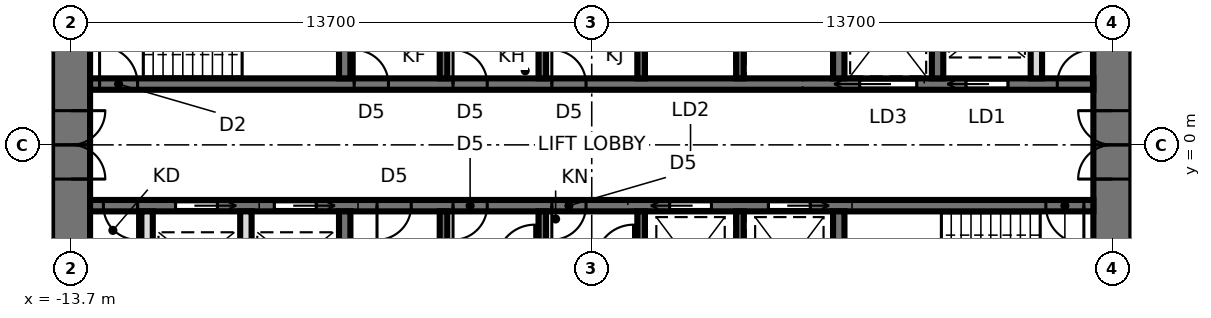
"""IFC4 building model, lengths in metres.
Left out: names, types, materials, properties, quantities, classifications, styles, units other than length and angle.
Written with IfcOpenShell. Run it as: python <this file> out.ifc"""

import sys

from ifc_helpers import new_model, si_unit, direction, frame, frame_2d, origin, place, context, subcontext, project, spatial, rectangle, extrude, element, fill, save


model = new_model("IFC4")
c1 = context("Model", 3, precision=1e-05, world=origin(), true_north=direction((0.0, 1.0)))
c2 = subcontext(c1, "Body", "Model", "MODEL_VIEW")
j1 = project(units=[si_unit("LENGTHUNIT", "METRE"), si_unit("PLANEANGLEUNIT", "RADIAN")], contexts=[c1])
p1 = place(None, origin())
s1 = spatial("IfcSite", under=j1, at=p1, CompositionType="ELEMENT")
p2 = place(p1, origin())
s2 = spatial("IfcBuilding", under=s1, at=p2, CompositionType="ELEMENT")
p3 = place(p2, frame((0.0, 0.0, 187.7)))
s3 = spatial("IfcBuildingStorey", under=s2, at=p3, CompositionType="ELEMENT", Elevation=187.7)
p4 = place(p3, frame((13.7, -9.5, 0.0), z_axis=(0.0, 0.0, 1.0), x_axis=(0.0, 1.0, 0.0)))
e1 = element("IfcWall", 1, at=p4, inside=s3, PredefinedType="SHEAR", context=c2, shape_type="SweptSolid", body=[
    extrude(rectangle(XDim=19.0, YDim=1.0, at=frame_2d((9.5, 0.0))), origin(), (0.0, 0.0, 1.0), 3.9),
])
p5 = place(p4, frame((8.6, 0.0, 0.0)))
e2 = element("IfcOpeningElement", 2, at=p5, cuts=e1, PredefinedType="OPENING", context=c2, shape_type="SweptSolid", body=[
    extrude(rectangle(XDim=1.8, YDim=2.4, at=frame_2d((0.9, 1.2))), frame((0.0, 0.51, 0.0), z_axis=(0.0, -1.0, 0.0), x_axis=(1.0, 0.0, 0.0)), (0.0, 0.0, 1.0), 1.02),
])
p6 = place(p3, frame((-13.7, 9.5, 0.0), z_axis=(0.0, 0.0, 1.0), x_axis=(0.0, -1.0, 0.0)))
e3 = element("IfcWall", 3, at=p6, inside=s3, PredefinedType="SHEAR", context=c2, shape_type="SweptSolid", body=[
    extrude(rectangle(XDim=19.0, YDim=1.0, at=frame_2d((9.5, 0.0))), origin(), (0.0, 0.0, 1.0), 3.9),
])
p7 = place(p6, frame((8.6, 0.0, 0.0)))
e4 = element("IfcOpeningElement", 4, at=p7, cuts=e3, PredefinedType="OPENING", context=c2, shape_type="SweptSolid", body=[
    extrude(rectangle(XDim=1.8, YDim=2.4, at=frame_2d((0.9, 1.2))), frame((0.0, 0.51, 0.0), z_axis=(0.0, -1.0, 0.0), x_axis=(1.0, 0.0, 0.0)), (0.0, 0.0, 1.0), 1.02),
])
p8 = place(p3, frame((-13.2, 1.6, 0.0), z_axis=(0.0, 0.0, 1.0), x_axis=(1.0, 0.0, 0.0)))
e5 = element("IfcWall", 5, at=p8, inside=s3, PredefinedType="SHEAR", context=c2, shape_type="SweptSolid", body=[
    extrude(rectangle(XDim=26.4, YDim=0.3, at=frame_2d((13.2, 0.0))), origin(), (0.0, 0.0, 1.0), 3.9),
])
p9 = place(p8, frame((0.25, 0.0, 0.0)))
e6 = element("IfcOpeningElement", 6, at=p9, cuts=e5, PredefinedType="OPENING", context=c2, shape_type="SweptSolid", body=[
    extrude(rectangle(XDim=1.0, YDim=2.1, at=frame_2d((0.5, 1.05))), frame((0.0, 0.16, 0.0), z_axis=(0.0, -1.0, 0.0), x_axis=(1.0, 0.0, 0.0)), (0.0, 0.0, 1.0), 0.32),
])
p10 = place(p8, frame((23.05, 0.0, 0.0)))
e7 = element("IfcOpeningElement", 7, at=p10, cuts=e5, PredefinedType="OPENING", context=c2, shape_type="SweptSolid", body=[
    extrude(rectangle(XDim=1.1, YDim=2.3, at=frame_2d((0.55, 1.15))), frame((0.0, 0.16, 0.0), z_axis=(0.0, -1.0, 0.0), x_axis=(1.0, 0.0, 0.0)), (0.0, 0.0, 1.0), 0.32),
])
p11 = place(p8, frame((20.25, 0.0, 0.0)))
e8 = element("IfcOpeningElement", 8, at=p11, cuts=e5, PredefinedType="OPENING", context=c2, shape_type="SweptSolid", body=[
    extrude(rectangle(XDim=1.5, YDim=2.4, at=frame_2d((0.75, 1.2))), frame((0.0, 0.16, 0.0), z_axis=(0.0, -1.0, 0.0), x_axis=(1.0, 0.0, 0.0)), (0.0, 0.0, 1.0), 0.32),
])
p12 = place(p8, frame((6.95, 0.0, 0.0)))
e9 = element("IfcOpeningElement", 9, at=p12, cuts=e5, PredefinedType="OPENING", context=c2, shape_type="SweptSolid", body=[
    extrude(rectangle(XDim=0.9, YDim=2.1, at=frame_2d((0.45, 1.05))), frame((0.0, 0.16, 0.0), z_axis=(0.0, -1.0, 0.0), x_axis=(1.0, 0.0, 0.0)), (0.0, 0.0, 1.0), 0.32),
])
p13 = place(p8, frame((9.55, 0.0, 0.0)))
e10 = element("IfcOpeningElement", 10, at=p13, cuts=e5, PredefinedType="OPENING", context=c2, shape_type="SweptSolid", body=[
    extrude(rectangle(XDim=0.9, YDim=2.1, at=frame_2d((0.45, 1.05))), frame((0.0, 0.16, 0.0), z_axis=(0.0, -1.0, 0.0), x_axis=(1.0, 0.0, 0.0)), (0.0, 0.0, 1.0), 0.32),
])
p14 = place(p8, frame((12.15, 0.0, 0.0)))
e11 = element("IfcOpeningElement", 11, at=p14, cuts=e5, PredefinedType="OPENING", context=c2, shape_type="SweptSolid", body=[
    extrude(rectangle(XDim=0.9, YDim=2.1, at=frame_2d((0.45, 1.05))), frame((0.0, 0.16, 0.0), z_axis=(0.0, -1.0, 0.0), x_axis=(1.0, 0.0, 0.0)), (0.0, 0.0, 1.0), 0.32),
])
p15 = place(p8, frame((25.45, 0.0, 0.0)))
e12 = element("IfcOpeningElement", 12, at=p15, cuts=e5, PredefinedType="OPENING", context=c2, shape_type="SweptSolid", body=[
    extrude(rectangle(XDim=0.9, YDim=2.1, at=frame_2d((0.45, 1.05))), frame((0.0, 0.16, 0.0), z_axis=(0.0, -1.0, 0.0), x_axis=(1.0, 0.0, 0.0)), (0.0, 0.0, 1.0), 0.32),
])
p16 = place(p3, frame((-13.2, -1.6, 0.0), z_axis=(0.0, 0.0, 1.0), x_axis=(1.0, 0.0, 0.0)))
e13 = element("IfcWall", 13, at=p16, inside=s3, PredefinedType="SHEAR", context=c2, shape_type="SweptSolid", body=[
    extrude(rectangle(XDim=26.4, YDim=0.3, at=frame_2d((13.2, 0.0))), origin(), (0.0, 0.0, 1.0), 3.9),
])
p17 = place(p16, frame((25.15, 0.0, 0.0)))
e14 = element("IfcOpeningElement", 14, at=p17, cuts=e13, PredefinedType="OPENING", context=c2, shape_type="SweptSolid", body=[
    extrude(rectangle(XDim=1.0, YDim=2.1, at=frame_2d((0.5, 1.05))), frame((0.0, 0.16, 0.0), z_axis=(0.0, -1.0, 0.0), x_axis=(1.0, 0.0, 0.0)), (0.0, 0.0, 1.0), 0.32),
])
p18 = place(p16, frame((7.55, 0.0, 0.0)))
e15 = element("IfcOpeningElement", 15, at=p18, cuts=e13, PredefinedType="OPENING", context=c2, shape_type="SweptSolid", body=[
    extrude(rectangle(XDim=0.9, YDim=2.1, at=frame_2d((0.45, 1.05))), frame((0.0, 0.16, 0.0), z_axis=(0.0, -1.0, 0.0), x_axis=(1.0, 0.0, 0.0)), (0.0, 0.0, 1.0), 0.32),
])
p19 = place(p16, frame((9.55, 0.0, 0.0)))
e16 = element("IfcOpeningElement", 16, at=p19, cuts=e13, PredefinedType="OPENING", context=c2, shape_type="SweptSolid", body=[
    extrude(rectangle(XDim=0.9, YDim=2.1, at=frame_2d((0.45, 1.05))), frame((0.0, 0.16, 0.0), z_axis=(0.0, -1.0, 0.0), x_axis=(1.0, 0.0, 0.0)), (0.0, 0.0, 1.0), 0.32),
])
p20 = place(p16, frame((12.15, 0.0, 0.0)))
e17 = element("IfcOpeningElement", 17, at=p20, cuts=e13, PredefinedType="OPENING", context=c2, shape_type="SweptSolid", body=[
    extrude(rectangle(XDim=0.9, YDim=2.1, at=frame_2d((0.45, 1.05))), frame((0.0, 0.16, 0.0), z_axis=(0.0, -1.0, 0.0), x_axis=(1.0, 0.0, 0.0)), (0.0, 0.0, 1.0), 0.32),
])
p21 = place(p16, frame((15.25, 0.0, 0.0)))
e18 = element("IfcOpeningElement", 18, at=p21, cuts=e13, PredefinedType="OPENING", context=c2, shape_type="SweptSolid", body=[
    extrude(rectangle(XDim=1.1, YDim=2.3, at=frame_2d((0.55, 1.15))), frame((0.0, 0.16, 0.0), z_axis=(0.0, -1.0, 0.0), x_axis=(1.0, 0.0, 0.0)), (0.0, 0.0, 1.0), 0.32),
])
p22 = place(p16, frame((17.85, 0.0, 0.0)))
e19 = element("IfcOpeningElement", 19, at=p22, cuts=e13, PredefinedType="OPENING", context=c2, shape_type="SweptSolid", body=[
    extrude(rectangle(XDim=1.1, YDim=2.3, at=frame_2d((0.55, 1.15))), frame((0.0, 0.16, 0.0), z_axis=(0.0, -1.0, 0.0), x_axis=(1.0, 0.0, 0.0)), (0.0, 0.0, 1.0), 0.32),
])
p23 = place(p16, frame((4.85, 0.0, 0.0)))
e20 = element("IfcOpeningElement", 20, at=p23, cuts=e13, PredefinedType="OPENING", context=c2, shape_type="SweptSolid", body=[
    extrude(rectangle(XDim=1.1, YDim=2.3, at=frame_2d((0.55, 1.15))), frame((0.0, 0.16, 0.0), z_axis=(0.0, -1.0, 0.0), x_axis=(1.0, 0.0, 0.0)), (0.0, 0.0, 1.0), 0.32),
])
p24 = place(p16, frame((2.25, 0.0, 0.0)))
e21 = element("IfcOpeningElement", 21, at=p24, cuts=e13, PredefinedType="OPENING", context=c2, shape_type="SweptSolid", body=[
    extrude(rectangle(XDim=1.1, YDim=2.3, at=frame_2d((0.55, 1.15))), frame((0.0, 0.16, 0.0), z_axis=(0.0, -1.0, 0.0), x_axis=(1.0, 0.0, 0.0)), (0.0, 0.0, 1.0), 0.32),
])
p25 = place(p16, frame((0.35, 0.0, 0.0)))
e22 = element("IfcOpeningElement", 22, at=p25, cuts=e13, PredefinedType="OPENING", context=c2, shape_type="SweptSolid", body=[
    extrude(rectangle(XDim=0.9, YDim=2.1, at=frame_2d((0.45, 1.05))), frame((0.0, 0.16, 0.0), z_axis=(0.0, -1.0, 0.0), x_axis=(1.0, 0.0, 0.0)), (0.0, 0.0, 1.0), 0.32),
])
for number, where, z_axis, x_axis in (
    (23, (-6.5, 1.75, 0.0), (0.0, 0.0, 1.0), (0.0, 1.0, 0.0)),
    (24, (6.5, 1.75, 0.0), (0.0, 0.0, 1.0), (0.0, 1.0, 0.0)),
):
    element("IfcWall", number, at=place(p3, frame(where, z_axis=z_axis, x_axis=x_axis)), inside=s3, PredefinedType="SHEAR", context=c2, shape_type="SweptSolid", body=[
        extrude(rectangle(XDim=2.7, YDim=0.3, at=frame_2d((1.35, 0.0))), origin(), (0.0, 0.0, 1.0), 3.9),
    ])
for number, where, z_axis, x_axis in (
    (25, (-3.9, 1.75, 0.0), (0.0, 0.0, 1.0), (0.0, 1.0, 0.0)),
    (26, (-1.3, 1.75, 0.0), (0.0, 0.0, 1.0), (0.0, 1.0, 0.0)),
    (27, (1.3, 1.75, 0.0), (0.0, 0.0, 1.0), (0.0, 1.0, 0.0)),
    (28, (3.9, 1.75, 0.0), (0.0, 0.0, 1.0), (0.0, 1.0, 0.0)),
):
    element("IfcWall", number, at=place(p3, frame(where, z_axis=z_axis, x_axis=x_axis)), inside=s3, PredefinedType="SHEAR", context=c2, shape_type="SweptSolid", body=[
        extrude(rectangle(XDim=2.7, YDim=0.2, at=frame_2d((1.35, 0.0))), origin(), (0.0, 0.0, 1.0), 3.9),
    ])
for number, where, z_axis, x_axis in (
    (29, (-6.5, -1.75, 0.0), (0.0, 0.0, 1.0), (0.0, -1.0, 0.0)),
    (30, (6.5, -1.75, 0.0), (0.0, 0.0, 1.0), (0.0, -1.0, 0.0)),
):
    element("IfcWall", number, at=place(p3, frame(where, z_axis=z_axis, x_axis=x_axis)), inside=s3, PredefinedType="SHEAR", context=c2, shape_type="SweptSolid", body=[
        extrude(rectangle(XDim=2.7, YDim=0.3, at=frame_2d((1.35, 0.0))), origin(), (0.0, 0.0, 1.0), 3.9),
    ])
for number, where, z_axis, x_axis in (
    (31, (-3.9, -1.75, 0.0), (0.0, 0.0, 1.0), (0.0, -1.0, 0.0)),
    (32, (-1.3, -1.75, 0.0), (0.0, 0.0, 1.0), (0.0, -1.0, 0.0)),
    (33, (1.3, -1.75, 0.0), (0.0, 0.0, 1.0), (0.0, -1.0, 0.0)),
    (34, (3.9, -1.75, 0.0), (0.0, 0.0, 1.0), (0.0, -1.0, 0.0)),
):
    element("IfcWall", number, at=place(p3, frame(where, z_axis=z_axis, x_axis=x_axis)), inside=s3, PredefinedType="SHEAR", context=c2, shape_type="SweptSolid", body=[
        extrude(rectangle(XDim=2.7, YDim=0.2, at=frame_2d((1.35, 0.0))), origin(), (0.0, 0.0, 1.0), 3.9),
    ])
p26 = place(p3, frame((9.1, 1.75, 0.0), z_axis=(0.0, 0.0, 1.0), x_axis=(0.0, 1.0, 0.0)))
e35 = element("IfcWall", 35, at=p26, inside=s3, PredefinedType="SHEAR", context=c2, shape_type="SweptSolid", body=[
    extrude(rectangle(XDim=2.7, YDim=0.3, at=frame_2d((1.35, 0.0))), origin(), (0.0, 0.0, 1.0), 3.9),
])
for number, where, z_axis, x_axis in (
    (36, (-9.1, -1.75, 0.0), (0.0, 0.0, 1.0), (0.0, -1.0, 0.0)),
    (37, (-11.7, -1.75, 0.0), (0.0, 0.0, 1.0), (0.0, -1.0, 0.0)),
    (38, (11.7, 1.75, 0.0), (0.0, 0.0, 1.0), (0.0, 1.0, 0.0)),
):
    element("IfcWall", number, at=place(p3, frame(where, z_axis=z_axis, x_axis=x_axis)), inside=s3, PredefinedType="SOLIDWALL", context=c2, shape_type="SweptSolid", body=[
        extrude(rectangle(XDim=2.7, YDim=0.3, at=frame_2d((1.35, 0.0))), origin(), (0.0, 0.0, 1.0), 3.74),
    ])
p27 = place(p7, origin())
e39 = element("IfcDoor", 39, at=p27, inside=s3, OperationType="DOUBLE_DOOR_SINGLE_SWING", PredefinedType="DOOR", context=c2, shape_type="SweptSolid", body=[
    extrude(rectangle(XDim=1.72, YDim=2.36, at=frame_2d((0.9, 1.18))), frame((0.0, 0.025, 0.0), z_axis=(0.0, -1.0, 0.0), x_axis=(1.0, 0.0, 0.0)), (0.0, 0.0, 1.0), 0.05),
    extrude(rectangle(XDim=0.04, YDim=2.4, at=frame_2d((0.02, 1.2))), frame((0.0, 0.25, 0.0), z_axis=(0.0, -1.0, 0.0), x_axis=(1.0, 0.0, 0.0)), (0.0, 0.0, 1.0), 0.5),
    extrude(rectangle(XDim=0.04, YDim=2.4, at=frame_2d((1.78, 1.2))), frame((0.0, 0.25, 0.0), z_axis=(0.0, -1.0, 0.0), x_axis=(1.0, 0.0, 0.0)), (0.0, 0.0, 1.0), 0.5),
    extrude(rectangle(XDim=1.72, YDim=0.04, at=frame_2d((0.9, 2.38))), frame((0.0, 0.25, 0.0), z_axis=(0.0, -1.0, 0.0), x_axis=(1.0, 0.0, 0.0)), (0.0, 0.0, 1.0), 0.5),
])
fill(e4, e39)
p28 = place(p5, origin())
e40 = element("IfcDoor", 40, at=p28, inside=s3, OperationType="DOUBLE_DOOR_SINGLE_SWING", PredefinedType="DOOR", context=c2, shape_type="SweptSolid", body=[
    extrude(rectangle(XDim=1.72, YDim=2.36, at=frame_2d((0.9, 1.18))), frame((0.0, 0.025, 0.0), z_axis=(0.0, -1.0, 0.0), x_axis=(1.0, 0.0, 0.0)), (0.0, 0.0, 1.0), 0.05),
    extrude(rectangle(XDim=0.04, YDim=2.4, at=frame_2d((0.02, 1.2))), frame((0.0, 0.25, 0.0), z_axis=(0.0, -1.0, 0.0), x_axis=(1.0, 0.0, 0.0)), (0.0, 0.0, 1.0), 0.5),
    extrude(rectangle(XDim=0.04, YDim=2.4, at=frame_2d((1.78, 1.2))), frame((0.0, 0.25, 0.0), z_axis=(0.0, -1.0, 0.0), x_axis=(1.0, 0.0, 0.0)), (0.0, 0.0, 1.0), 0.5),
    extrude(rectangle(XDim=1.72, YDim=0.04, at=frame_2d((0.9, 2.38))), frame((0.0, 0.25, 0.0), z_axis=(0.0, -1.0, 0.0), x_axis=(1.0, 0.0, 0.0)), (0.0, 0.0, 1.0), 0.5),
])
fill(e2, e40)
p29 = place(p9, origin())
e41 = element("IfcDoor", 41, at=p29, inside=s3, OperationType="SINGLE_SWING_LEFT", PredefinedType="DOOR", context=c2, shape_type="SweptSolid", body=[
    extrude(rectangle(XDim=1.0, YDim=2.1, at=frame_2d((0.5, 1.05))), frame((0.0, 0.025, 0.0), z_axis=(0.0, -1.0, 0.0), x_axis=(1.0, 0.0, 0.0)), (0.0, 0.0, 1.0), 0.05),
])
fill(e6, e41)
p30 = place(p17, frame((1.0, 0.0, 0.0), z_axis=(0.0, 0.0, 1.0), x_axis=(-1.0, 0.0, 0.0)))
e42 = element("IfcDoor", 42, at=p30, inside=s3, OperationType="SINGLE_SWING_LEFT", PredefinedType="DOOR", context=c2, shape_type="SweptSolid", body=[
    extrude(rectangle(XDim=1.0, YDim=2.1, at=frame_2d((0.5, 1.05))), frame((0.0, 0.025, 0.0), z_axis=(0.0, -1.0, 0.0), x_axis=(1.0, 0.0, 0.0)), (0.0, 0.0, 1.0), 0.05),
])
fill(e14, e42)
p31 = place(p10, origin())
e43 = element("IfcDoor", 43, at=p31, inside=s3, OperationType="SLIDING_TO_LEFT", PredefinedType="DOOR", context=c2, shape_type="SweptSolid", body=[
    extrude(rectangle(XDim=1.1, YDim=2.3, at=frame_2d((0.55, 1.15))), frame((0.0, 0.025, 0.0), z_axis=(0.0, -1.0, 0.0), x_axis=(1.0, 0.0, 0.0)), (0.0, 0.0, 1.0), 0.05),
])
fill(e7, e43)
p32 = place(p11, origin())
e44 = element("IfcDoor", 44, at=p32, inside=s3, OperationType="SLIDING_TO_LEFT", PredefinedType="DOOR", context=c2, shape_type="SweptSolid", body=[
    extrude(rectangle(XDim=1.5, YDim=2.4, at=frame_2d((0.75, 1.2))), frame((0.0, 0.025, 0.0), z_axis=(0.0, -1.0, 0.0), x_axis=(1.0, 0.0, 0.0)), (0.0, 0.0, 1.0), 0.05),
])
fill(e8, e44)
p33 = place(p12, origin())
e45 = element("IfcDoor", 45, at=p33, inside=s3, OperationType="SINGLE_SWING_LEFT", PredefinedType="DOOR", context=c2, shape_type="SweptSolid", body=[
    extrude(rectangle(XDim=0.9, YDim=2.1, at=frame_2d((0.45, 1.05))), frame((0.0, 0.025, 0.0), z_axis=(0.0, -1.0, 0.0), x_axis=(1.0, 0.0, 0.0)), (0.0, 0.0, 1.0), 0.05),
])
fill(e9, e45)
p34 = place(p13, origin())
e46 = element("IfcDoor", 46, at=p34, inside=s3, OperationType="SINGLE_SWING_LEFT", PredefinedType="DOOR", context=c2, shape_type="SweptSolid", body=[
    extrude(rectangle(XDim=0.9, YDim=2.1, at=frame_2d((0.45, 1.05))), frame((0.0, 0.025, 0.0), z_axis=(0.0, -1.0, 0.0), x_axis=(1.0, 0.0, 0.0)), (0.0, 0.0, 1.0), 0.05),
])
fill(e10, e46)
p35 = place(p14, origin())
e47 = element("IfcDoor", 47, at=p35, inside=s3, OperationType="SINGLE_SWING_LEFT", PredefinedType="DOOR", context=c2, shape_type="SweptSolid", body=[
    extrude(rectangle(XDim=0.9, YDim=2.1, at=frame_2d((0.45, 1.05))), frame((0.0, 0.025, 0.0), z_axis=(0.0, -1.0, 0.0), x_axis=(1.0, 0.0, 0.0)), (0.0, 0.0, 1.0), 0.05),
])
fill(e11, e47)
p36 = place(p18, frame((0.9, 0.0, 0.0), z_axis=(0.0, 0.0, 1.0), x_axis=(-1.0, 0.0, 0.0)))
e48 = element("IfcDoor", 48, at=p36, inside=s3, OperationType="SINGLE_SWING_RIGHT", PredefinedType="DOOR", context=c2, shape_type="SweptSolid", body=[
    extrude(rectangle(XDim=0.9, YDim=2.1, at=frame_2d((0.45, 1.05))), frame((0.0, 0.025, 0.0), z_axis=(0.0, -1.0, 0.0), x_axis=(1.0, 0.0, 0.0)), (0.0, 0.0, 1.0), 0.05),
])
fill(e15, e48)
p37 = place(p19, frame((0.9, 0.0, 0.0), z_axis=(0.0, 0.0, 1.0), x_axis=(-1.0, 0.0, 0.0)))
e49 = element("IfcDoor", 49, at=p37, inside=s3, OperationType="SINGLE_SWING_RIGHT", PredefinedType="DOOR", context=c2, shape_type="SweptSolid", body=[
    extrude(rectangle(XDim=0.9, YDim=2.1, at=frame_2d((0.45, 1.05))), frame((0.0, 0.025, 0.0), z_axis=(0.0, -1.0, 0.0), x_axis=(1.0, 0.0, 0.0)), (0.0, 0.0, 1.0), 0.05),
])
fill(e16, e49)
p38 = place(p20, frame((0.9, 0.0, 0.0), z_axis=(0.0, 0.0, 1.0), x_axis=(-1.0, 0.0, 0.0)))
e50 = element("IfcDoor", 50, at=p38, inside=s3, OperationType="SINGLE_SWING_RIGHT", PredefinedType="DOOR", context=c2, shape_type="SweptSolid", body=[
    extrude(rectangle(XDim=0.9, YDim=2.1, at=frame_2d((0.45, 1.05))), frame((0.0, 0.025, 0.0), z_axis=(0.0, -1.0, 0.0), x_axis=(1.0, 0.0, 0.0)), (0.0, 0.0, 1.0), 0.05),
])
fill(e17, e50)
p39 = place(p21, frame((1.1, 0.0, 0.0), z_axis=(0.0, 0.0, 1.0), x_axis=(-1.0, 0.0, 0.0)))
e51 = element("IfcDoor", 51, at=p39, inside=s3, OperationType="SLIDING_TO_RIGHT", PredefinedType="DOOR", context=c2, shape_type="SweptSolid", body=[
    extrude(rectangle(XDim=1.1, YDim=2.3, at=frame_2d((0.55, 1.15))), frame((0.0, 0.025, 0.0), z_axis=(0.0, -1.0, 0.0), x_axis=(1.0, 0.0, 0.0)), (0.0, 0.0, 1.0), 0.05),
])
fill(e18, e51)
p40 = place(p22, frame((1.1, 0.0, 0.0), z_axis=(0.0, 0.0, 1.0), x_axis=(-1.0, 0.0, 0.0)))
e52 = element("IfcDoor", 52, at=p40, inside=s3, OperationType="SLIDING_TO_LEFT", PredefinedType="DOOR", context=c2, shape_type="SweptSolid", body=[
    extrude(rectangle(XDim=1.1, YDim=2.3, at=frame_2d((0.55, 1.15))), frame((0.0, 0.025, 0.0), z_axis=(0.0, -1.0, 0.0), x_axis=(1.0, 0.0, 0.0)), (0.0, 0.0, 1.0), 0.05),
])
fill(e19, e52)
p41 = place(p23, frame((1.1, 0.0, 0.0), z_axis=(0.0, 0.0, 1.0), x_axis=(-1.0, 0.0, 0.0)))
e53 = element("IfcDoor", 53, at=p41, inside=s3, OperationType="SLIDING_TO_LEFT", PredefinedType="DOOR", context=c2, shape_type="SweptSolid", body=[
    extrude(rectangle(XDim=1.1, YDim=2.3, at=frame_2d((0.55, 1.15))), frame((0.0, 0.025, 0.0), z_axis=(0.0, -1.0, 0.0), x_axis=(1.0, 0.0, 0.0)), (0.0, 0.0, 1.0), 0.05),
])
fill(e20, e53)
p42 = place(p24, frame((1.1, 0.0, 0.0), z_axis=(0.0, 0.0, 1.0), x_axis=(-1.0, 0.0, 0.0)))
e54 = element("IfcDoor", 54, at=p42, inside=s3, OperationType="SLIDING_TO_LEFT", PredefinedType="DOOR", context=c2, shape_type="SweptSolid", body=[
    extrude(rectangle(XDim=1.1, YDim=2.3, at=frame_2d((0.55, 1.15))), frame((0.0, 0.025, 0.0), z_axis=(0.0, -1.0, 0.0), x_axis=(1.0, 0.0, 0.0)), (0.0, 0.0, 1.0), 0.05),
])
fill(e21, e54)
p43 = place(p15, origin())
e55 = element("IfcDoor", 55, at=p43, inside=s3, OperationType="SINGLE_SWING_RIGHT", PredefinedType="DOOR", context=c2, shape_type="SweptSolid", body=[
    extrude(rectangle(XDim=0.9, YDim=2.1, at=frame_2d((0.45, 1.05))), frame((0.0, 0.025, 0.0), z_axis=(0.0, -1.0, 0.0), x_axis=(1.0, 0.0, 0.0)), (0.0, 0.0, 1.0), 0.05),
])
fill(e12, e55)
p44 = place(p25, frame((0.9, 0.0, 0.0), z_axis=(0.0, 0.0, 1.0), x_axis=(-1.0, 0.0, 0.0)))
e56 = element("IfcDoor", 56, at=p44, inside=s3, OperationType="SINGLE_SWING_LEFT", PredefinedType="DOOR", context=c2, shape_type="SweptSolid", body=[
    extrude(rectangle(XDim=0.9, YDim=2.1, at=frame_2d((0.45, 1.05))), frame((0.0, 0.025, 0.0), z_axis=(0.0, -1.0, 0.0), x_axis=(1.0, 0.0, 0.0)), (0.0, 0.0, 1.0), 0.05),
])
fill(e22, e56)
save(model, sys.argv[1])
